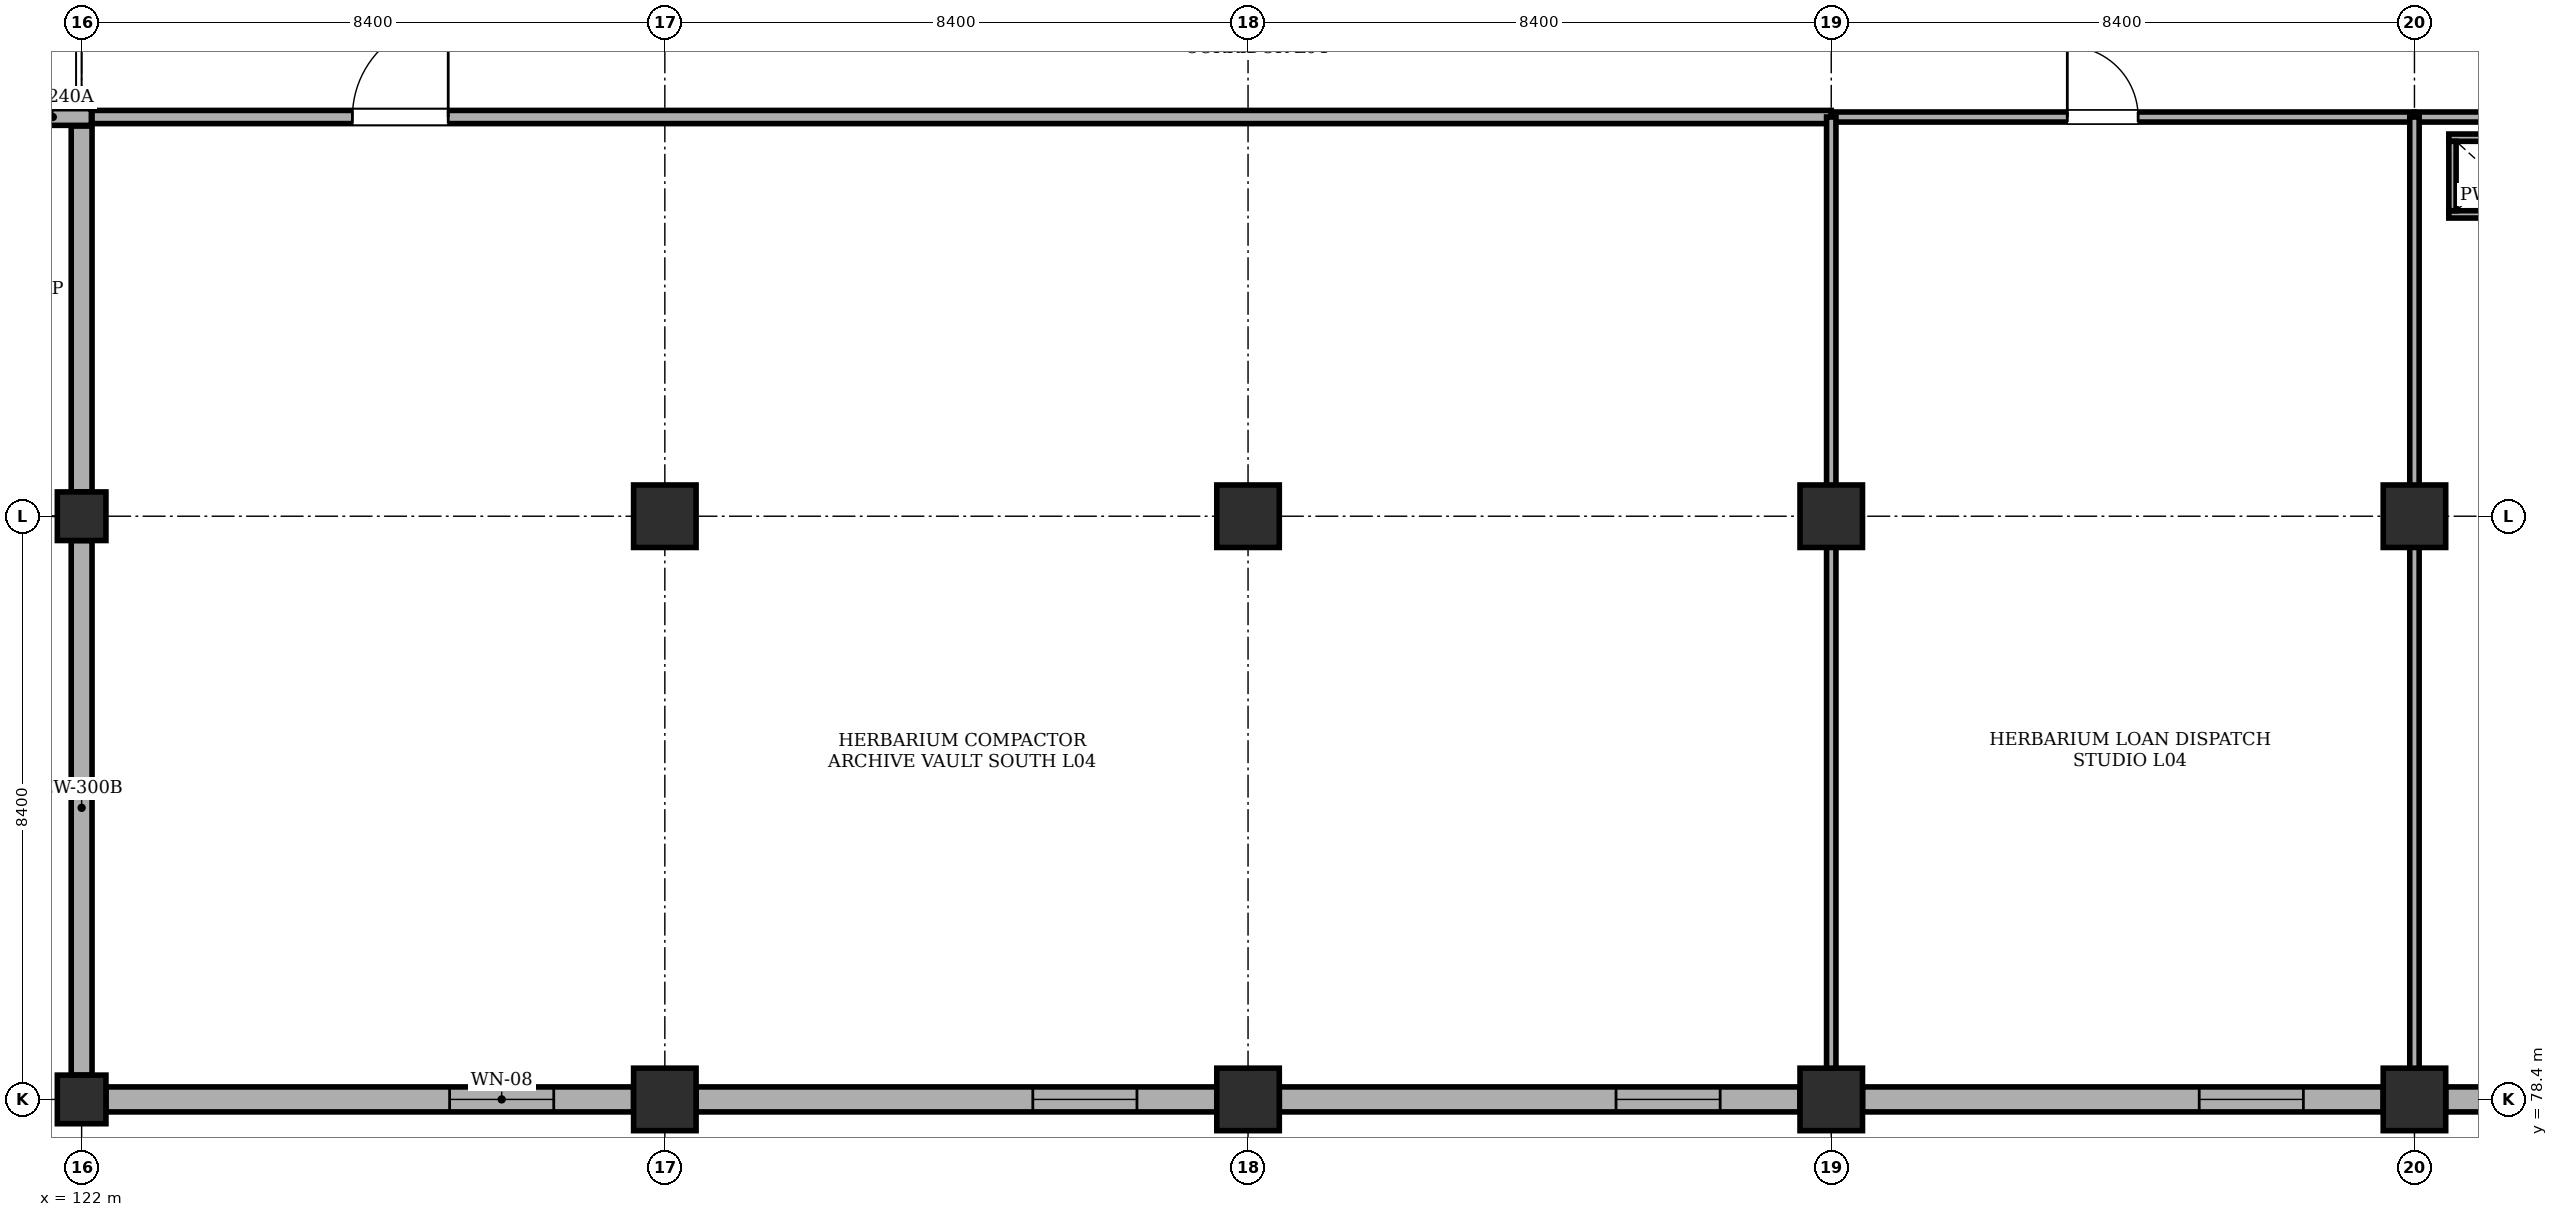
"""IFC4 building model, lengths in metres.
Left out: names, types, materials, properties, quantities, classifications, styles, units other than length and angle.
Written with IfcOpenShell. Run it as: python <this file> out.ifc"""

import sys

from ifc_helpers import new_model, si_unit, direction, frame, frame_2d, origin, origin_2d, place, context, subcontext, project, spatial, rectangle, extrude, element, fill, save


model = new_model("IFC4")
c1 = context("Model", 3, precision=1e-05, world=origin(), true_north=direction((0.0, 1.0)))
c2 = subcontext(c1, "Body", "Model", "MODEL_VIEW")
j1 = project(units=[si_unit("LENGTHUNIT", "METRE"), si_unit("PLANEANGLEUNIT", "RADIAN")], contexts=[c1])
p1 = place(None, origin())
s1 = spatial("IfcSite", under=j1, at=p1, CompositionType="ELEMENT")
p2 = place(p1, origin())
s2 = spatial("IfcBuilding", under=s1, at=p2, CompositionType="ELEMENT")
p3 = place(p2, frame((0.0, 0.0, 14.7)))
s3 = spatial("IfcBuildingStorey", under=s2, at=p3, CompositionType="ELEMENT", Elevation=14.7)
for number, where, z_axis, x_axis in (
    (1, (122.0, 78.4, 0.0), (0.0, 0.0, 1.0), (1.0, 0.0, 0.0)),
    (2, (122.0, 86.8, 0.0), (0.0, 0.0, 1.0), (1.0, 0.0, 0.0)),
):
    element("IfcColumn", number, at=place(p3, frame(where, z_axis=z_axis, x_axis=x_axis)), inside=s3, PredefinedType="COLUMN", context=c2, shape_type="SweptSolid", body=[
        extrude(rectangle(XDim=0.7, YDim=0.7, at=origin_2d()), origin(), (0.0, 0.0, 1.0), 4.26),
    ])
for number, where, z_axis, x_axis in (
    (3, (130.4, 78.4, 0.0), (0.0, 0.0, 1.0), (1.0, 0.0, 0.0)),
    (4, (130.4, 86.8, 0.0), (0.0, 0.0, 1.0), (1.0, 0.0, 0.0)),
    (5, (138.8, 78.4, 0.0), (0.0, 0.0, 1.0), (1.0, 0.0, 0.0)),
    (6, (138.8, 86.8, 0.0), (0.0, 0.0, 1.0), (1.0, 0.0, 0.0)),
    (7, (147.2, 78.4, 0.0), (0.0, 0.0, 1.0), (1.0, 0.0, 0.0)),
    (8, (147.2, 86.8, 0.0), (0.0, 0.0, 1.0), (1.0, 0.0, 0.0)),
    (9, (155.6, 78.4, 0.0), (0.0, 0.0, 1.0), (1.0, 0.0, 0.0)),
    (10, (155.6, 86.8, 0.0), (0.0, 0.0, 1.0), (1.0, 0.0, 0.0)),
):
    element("IfcColumn", number, at=place(p3, frame(where, z_axis=z_axis, x_axis=x_axis)), inside=s3, PredefinedType="COLUMN", context=c2, shape_type="SweptSolid", body=[
        extrude(rectangle(XDim=0.9, YDim=0.9, at=origin_2d()), origin(), (0.0, 0.0, 1.0), 4.26),
    ])
p4 = place(p3, frame((129.95, 78.4, 0.0), z_axis=(0.0, 0.0, 1.0), x_axis=(-1.0, 0.0, 0.0)))
e11 = element("IfcWall", 11, at=p4, inside=s3, PredefinedType="STANDARD", context=c2, shape_type="SweptSolid", body=[
    extrude(rectangle(XDim=7.6, YDim=0.36, at=frame_2d((3.8, 0.0))), origin(), (0.0, 0.0, 1.0), 3.56),
])
p5 = place(p4, frame((1.15, 0.0, 0.95)))
e12 = element("IfcOpeningElement", 12, at=p5, cuts=e11, PredefinedType="OPENING", context=c2, shape_type="SweptSolid", body=[
    extrude(rectangle(XDim=1.5, YDim=1.5, at=frame_2d((0.75, 0.75))), frame((0.0, 0.19, 0.0), z_axis=(0.0, -1.0, 0.0), x_axis=(1.0, 0.0, 0.0)), (0.0, 0.0, 1.0), 0.38),
])
p6 = place(p3, frame((138.35, 78.4, 0.0), z_axis=(0.0, 0.0, 1.0), x_axis=(-1.0, 0.0, 0.0)))
e13 = element("IfcWall", 13, at=p6, inside=s3, PredefinedType="STANDARD", context=c2, shape_type="SweptSolid", body=[
    extrude(rectangle(XDim=7.5, YDim=0.36, at=frame_2d((3.75, 0.0))), origin(), (0.0, 0.0, 1.0), 3.56),
])
p7 = place(p6, frame((1.15, 0.0, 0.95)))
e14 = element("IfcOpeningElement", 14, at=p7, cuts=e13, PredefinedType="OPENING", context=c2, shape_type="SweptSolid", body=[
    extrude(rectangle(XDim=1.5, YDim=1.5, at=frame_2d((0.75, 0.75))), frame((0.0, 0.19, 0.0), z_axis=(0.0, -1.0, 0.0), x_axis=(1.0, 0.0, 0.0)), (0.0, 0.0, 1.0), 0.38),
])
p8 = place(p3, frame((146.75, 78.4, 0.0), z_axis=(0.0, 0.0, 1.0), x_axis=(-1.0, 0.0, 0.0)))
e15 = element("IfcWall", 15, at=p8, inside=s3, PredefinedType="STANDARD", context=c2, shape_type="SweptSolid", body=[
    extrude(rectangle(XDim=7.5, YDim=0.36, at=frame_2d((3.75, 0.0))), origin(), (0.0, 0.0, 1.0), 3.56),
])
p9 = place(p8, frame((1.15, 0.0, 0.95)))
e16 = element("IfcOpeningElement", 16, at=p9, cuts=e15, PredefinedType="OPENING", context=c2, shape_type="SweptSolid", body=[
    extrude(rectangle(XDim=1.5, YDim=1.5, at=frame_2d((0.75, 0.75))), frame((0.0, 0.19, 0.0), z_axis=(0.0, -1.0, 0.0), x_axis=(1.0, 0.0, 0.0)), (0.0, 0.0, 1.0), 0.38),
])
p10 = place(p3, frame((155.15, 78.4, 0.0), z_axis=(0.0, 0.0, 1.0), x_axis=(-1.0, 0.0, 0.0)))
e17 = element("IfcWall", 17, at=p10, inside=s3, PredefinedType="STANDARD", context=c2, shape_type="SweptSolid", body=[
    extrude(rectangle(XDim=7.5, YDim=0.36, at=frame_2d((3.75, 0.0))), origin(), (0.0, 0.0, 1.0), 3.56),
])
p11 = place(p10, frame((1.15, 0.0, 0.95)))
e18 = element("IfcOpeningElement", 18, at=p11, cuts=e17, PredefinedType="OPENING", context=c2, shape_type="SweptSolid", body=[
    extrude(rectangle(XDim=1.5, YDim=1.5, at=frame_2d((0.75, 0.75))), frame((0.0, 0.19, 0.0), z_axis=(0.0, -1.0, 0.0), x_axis=(1.0, 0.0, 0.0)), (0.0, 0.0, 1.0), 0.38),
])
p12 = place(p3, frame((163.0, 78.4, 0.0), z_axis=(0.0, 0.0, 1.0), x_axis=(-1.0, 0.0, 0.0)))
e19 = element("IfcWall", 19, at=p12, inside=s3, PredefinedType="STANDARD", context=c2, shape_type="SweptSolid", body=[
    extrude(rectangle(XDim=6.95, YDim=0.36, at=frame_2d((3.475, 0.0))), origin(), (0.0, 0.0, 1.0), 3.56),
])
p13 = place(p12, frame((1.15, 0.0, 0.95)))
e20 = element("IfcOpeningElement", 20, at=p13, cuts=e19, PredefinedType="OPENING", context=c2, shape_type="SweptSolid", body=[
    extrude(rectangle(XDim=1.5, YDim=1.5, at=frame_2d((0.75, 0.75))), frame((0.0, 0.19, 0.0), z_axis=(0.0, -1.0, 0.0), x_axis=(1.0, 0.0, 0.0)), (0.0, 0.0, 1.0), 0.38),
])
p14 = place(p3, frame((122.0, 78.75, 0.0), z_axis=(0.0, 0.0, 1.0), x_axis=(0.0, 1.0, 0.0)))
e21 = element("IfcWall", 21, at=p14, inside=s3, PredefinedType="STANDARD", context=c2, shape_type="SweptSolid", body=[
    extrude(rectangle(XDim=7.7, YDim=0.3, at=frame_2d((3.85, 0.0))), origin(), (0.0, 0.0, 1.0), 3.51),
])
p15 = place(p3, frame((122.0, 87.15, 0.0), z_axis=(0.0, 0.0, 1.0), x_axis=(0.0, 1.0, 0.0)))
e22 = element("IfcWall", 22, at=p15, inside=s3, PredefinedType="STANDARD", context=c2, shape_type="SweptSolid", body=[
    extrude(rectangle(XDim=5.27, YDim=0.3, at=frame_2d((2.635, 0.0))), origin(), (0.0, 0.0, 1.0), 3.51),
])
p16 = place(p3, frame((122.14, 92.55, 0.0), z_axis=(0.0, 0.0, 1.0), x_axis=(-1.0, 0.0, 0.0)))
e23 = element("IfcWall", 23, at=p16, inside=s3, PredefinedType="STANDARD", context=c2, shape_type="SweptSolid", body=[
    extrude(rectangle(XDim=1.11, YDim=0.24, at=frame_2d((0.555, 0.0))), origin(), (0.0, 0.0, 1.0), 4.26),
])
p17 = place(p3, frame((122.15, 92.55, 0.0), z_axis=(0.0, 0.0, 1.0), x_axis=(1.0, 0.0, 0.0)))
e24 = element("IfcWall", 24, at=p17, inside=s3, PredefinedType="SOLIDWALL", context=c2, shape_type="SweptSolid", body=[
    extrude(rectangle(XDim=25.05, YDim=0.19, at=frame_2d((12.525, 0.0))), origin(), (0.0, 0.0, 1.0), 4.26),
])
p18 = place(p17, frame((3.75, 0.0, 0.0)))
e25 = element("IfcOpeningElement", 25, at=p18, cuts=e24, PredefinedType="OPENING", context=c2, shape_type="SweptSolid", body=[
    extrude(rectangle(XDim=1.38, YDim=2.22, at=frame_2d((0.69, 1.11))), frame((0.0, 0.105, 0.0), z_axis=(0.0, -1.0, 0.0), x_axis=(1.0, 0.0, 0.0)), (0.0, 0.0, 1.0), 0.21),
])
p19 = place(p3, frame((147.2, 92.55, 0.0), z_axis=(0.0, 0.0, 1.0), x_axis=(1.0, 0.0, 0.0)))
e26 = element("IfcWall", 26, at=p19, inside=s3, PredefinedType="PARTITIONING", context=c2, shape_type="SweptSolid", body=[
    extrude(rectangle(XDim=8.4, YDim=0.145, at=frame_2d((4.2, 0.0))), origin(), (0.0, 0.0, 1.0), 4.26),
])
p20 = place(p19, frame((3.4, 0.0, 0.0)))
e27 = element("IfcOpeningElement", 27, at=p20, cuts=e26, PredefinedType="OPENING", context=c2, shape_type="SweptSolid", body=[
    extrude(rectangle(XDim=1.02, YDim=2.15, at=frame_2d((0.51, 1.075))), frame((0.0, 0.083, 0.0), z_axis=(0.0, -1.0, 0.0), x_axis=(1.0, 0.0, 0.0)), (0.0, 0.0, 1.0), 0.165),
])
p21 = place(p3, frame((147.2, 78.55, 0.0), z_axis=(0.0, 0.0, 1.0), x_axis=(0.0, 1.0, 0.0)))
e28 = element("IfcWall", 28, at=p21, inside=s3, PredefinedType="PARTITIONING", context=c2, shape_type="SweptSolid", body=[
    extrude(rectangle(XDim=14.0, YDim=0.135, at=frame_2d((7.0, 0.0))), origin(), (0.0, 0.0, 1.0), 3.51),
])
p22 = place(p3, frame((155.6, 92.55, 0.0), z_axis=(0.0, 0.0, 1.0), x_axis=(1.0, 0.0, 0.0)))
e29 = element("IfcWall", 29, at=p22, inside=s3, PredefinedType="PARTITIONING", context=c2, shape_type="SweptSolid", body=[
    extrude(rectangle(XDim=7.75, YDim=0.145, at=frame_2d((3.875, 0.0))), origin(), (0.0, 0.0, 1.0), 4.26),
])
p23 = place(p22, frame((3.4, 0.0, 0.0)))
e30 = element("IfcOpeningElement", 30, at=p23, cuts=e29, PredefinedType="OPENING", context=c2, shape_type="SweptSolid", body=[
    extrude(rectangle(XDim=1.02, YDim=2.15, at=frame_2d((0.51, 1.075))), frame((0.0, 0.083, 0.0), z_axis=(0.0, -1.0, 0.0), x_axis=(1.0, 0.0, 0.0)), (0.0, 0.0, 1.0), 0.165),
])
p24 = place(p3, frame((155.6, 78.55, 0.0), z_axis=(0.0, 0.0, 1.0), x_axis=(0.0, 1.0, 0.0)))
e31 = element("IfcWall", 31, at=p24, inside=s3, PredefinedType="PARTITIONING", context=c2, shape_type="SweptSolid", body=[
    extrude(rectangle(XDim=14.0, YDim=0.135, at=frame_2d((7.0, 0.0))), origin(), (0.0, 0.0, 1.0), 3.51),
])
for number, where, z_axis, x_axis in (
    (32, (156.095, 91.147, 0.0), (0.0, 0.0, 1.0), (1.0, 0.0, 0.0)),
    (33, (156.095, 92.252, 0.0), (0.0, 0.0, 1.0), (1.0, 0.0, 0.0)),
):
    element("IfcWall", number, at=place(p3, frame(where, z_axis=z_axis, x_axis=x_axis)), inside=s3, PredefinedType="PARTITIONING", context=c2, shape_type="SweptSolid", body=[
        extrude(rectangle(XDim=1.31, YDim=0.105, at=frame_2d((0.655, 0.0))), origin(), (0.0, 0.0, 1.0), 4.26),
    ])
p25 = place(p3, frame((156.147, 91.2, 0.0), z_axis=(0.0, 0.0, 1.0), x_axis=(0.0, 1.0, 0.0)))
e34 = element("IfcWall", 34, at=p25, inside=s3, PredefinedType="PARTITIONING", context=c2, shape_type="SweptSolid", body=[
    extrude(rectangle(XDim=1.0, YDim=0.105, at=frame_2d((0.5, 0.0))), origin(), (0.0, 0.0, 1.0), 4.26),
])
p26 = place(p5, origin())
e35 = element("IfcWindow", 35, at=p26, inside=s3, PartitioningType="DOUBLE_PANEL_VERTICAL", PredefinedType="WINDOW", context=c2, shape_type="SweptSolid", body=[
    extrude(rectangle(XDim=1.5, YDim=1.5, at=frame_2d((0.75, 0.75))), frame((0.0, 0.03, 0.0), z_axis=(0.0, -1.0, 0.0), x_axis=(1.0, 0.0, 0.0)), (0.0, 0.0, 1.0), 0.06),
])
fill(e12, e35)
p27 = place(p7, origin())
e36 = element("IfcWindow", 36, at=p27, inside=s3, PartitioningType="DOUBLE_PANEL_VERTICAL", PredefinedType="WINDOW", context=c2, shape_type="SweptSolid", body=[
    extrude(rectangle(XDim=1.5, YDim=1.5, at=frame_2d((0.75, 0.75))), frame((0.0, 0.03, 0.0), z_axis=(0.0, -1.0, 0.0), x_axis=(1.0, 0.0, 0.0)), (0.0, 0.0, 1.0), 0.06),
])
fill(e14, e36)
p28 = place(p9, origin())
e37 = element("IfcWindow", 37, at=p28, inside=s3, PartitioningType="DOUBLE_PANEL_VERTICAL", PredefinedType="WINDOW", context=c2, shape_type="SweptSolid", body=[
    extrude(rectangle(XDim=1.5, YDim=1.5, at=frame_2d((0.75, 0.75))), frame((0.0, 0.03, 0.0), z_axis=(0.0, -1.0, 0.0), x_axis=(1.0, 0.0, 0.0)), (0.0, 0.0, 1.0), 0.06),
])
fill(e16, e37)
p29 = place(p11, origin())
e38 = element("IfcWindow", 38, at=p29, inside=s3, PartitioningType="DOUBLE_PANEL_VERTICAL", PredefinedType="WINDOW", context=c2, shape_type="SweptSolid", body=[
    extrude(rectangle(XDim=1.5, YDim=1.5, at=frame_2d((0.75, 0.75))), frame((0.0, 0.03, 0.0), z_axis=(0.0, -1.0, 0.0), x_axis=(1.0, 0.0, 0.0)), (0.0, 0.0, 1.0), 0.06),
])
fill(e18, e38)
p30 = place(p18, origin())
e39 = element("IfcDoor", 39, at=p30, inside=s3, OperationType="SINGLE_SWING_RIGHT", PredefinedType="DOOR", context=c2, shape_type="SweptSolid", body=[
    extrude(rectangle(XDim=1.38, YDim=2.22, at=frame_2d((0.69, 1.11))), frame((0.0, 0.025, 0.0), z_axis=(0.0, -1.0, 0.0), x_axis=(1.0, 0.0, 0.0)), (0.0, 0.0, 1.0), 0.05),
])
fill(e25, e39)
p31 = place(p20, origin())
e40 = element("IfcDoor", 40, at=p31, inside=s3, OperationType="SINGLE_SWING_LEFT", PredefinedType="DOOR", context=c2, shape_type="SweptSolid", body=[
    extrude(rectangle(XDim=1.02, YDim=2.15, at=frame_2d((0.51, 1.075))), frame((0.0, 0.025, 0.0), z_axis=(0.0, -1.0, 0.0), x_axis=(1.0, 0.0, 0.0)), (0.0, 0.0, 1.0), 0.05),
])
fill(e27, e40)
save(model, sys.argv[1])
